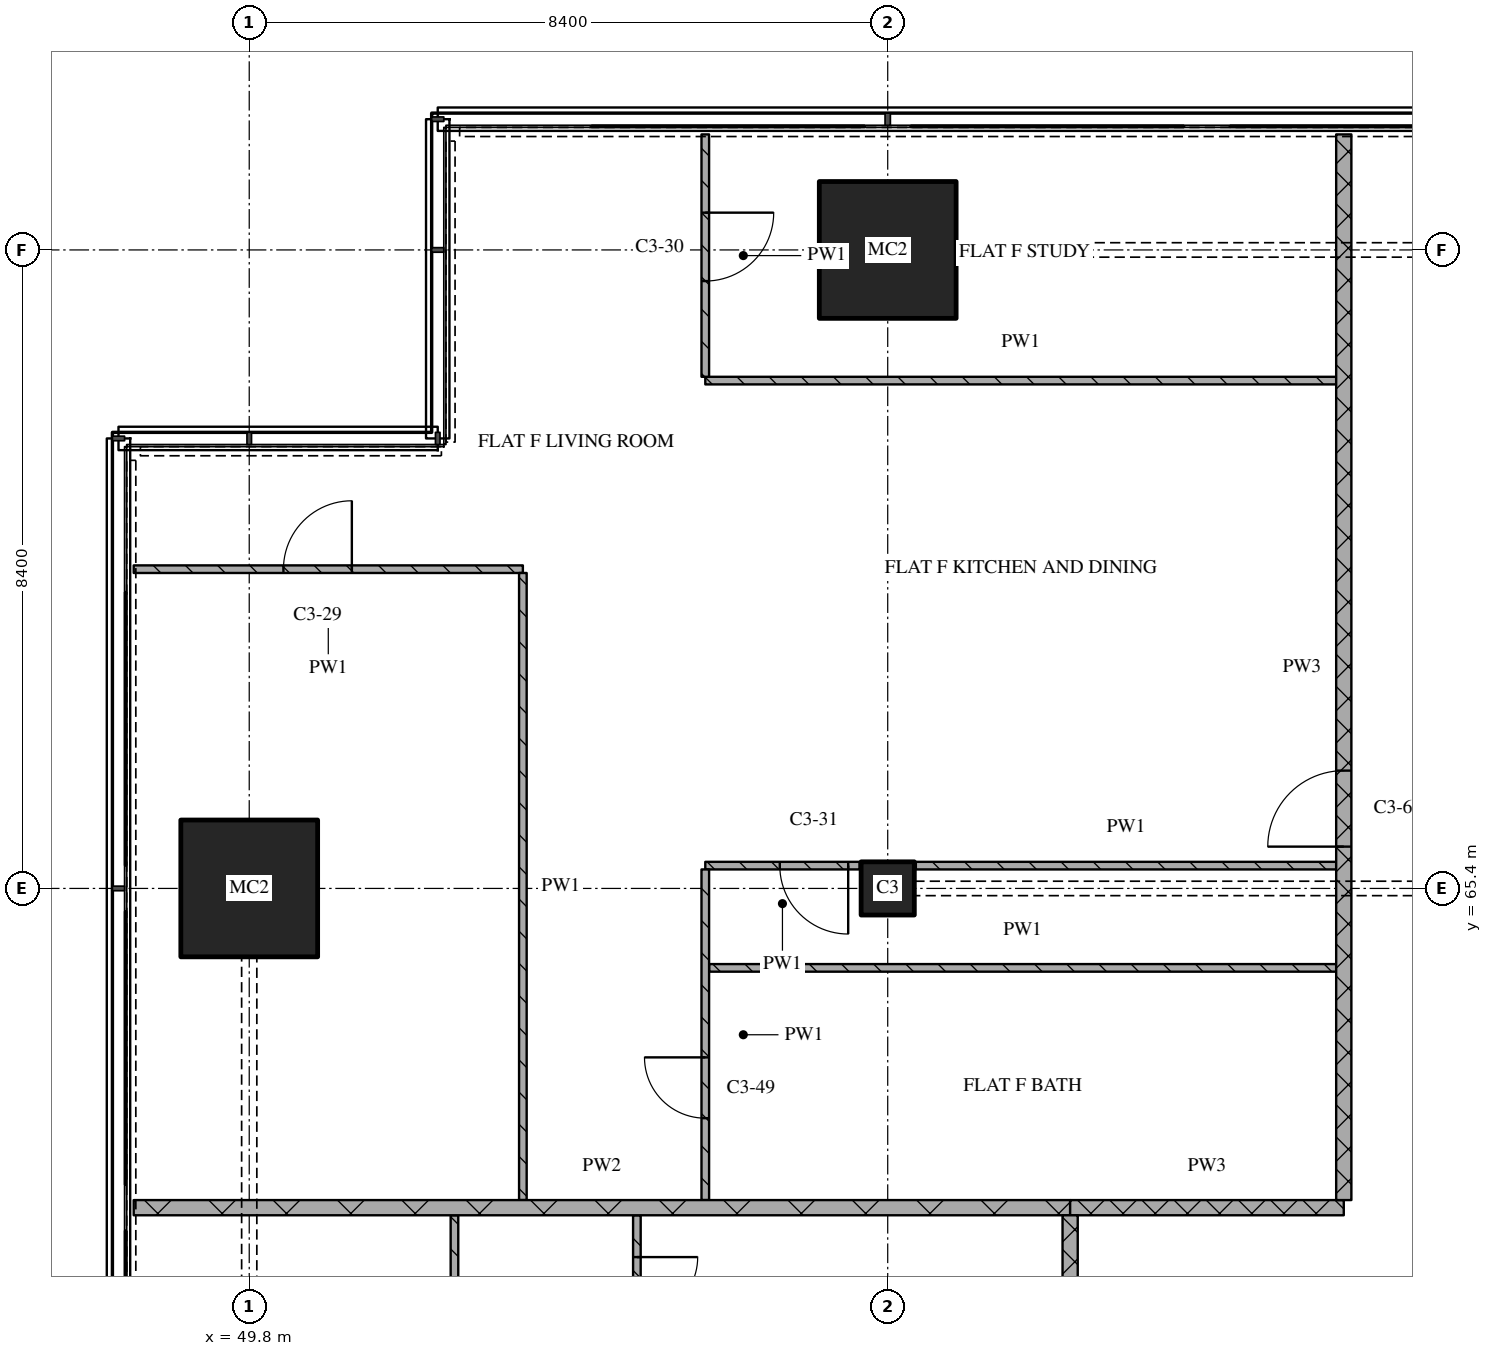
"""IFC4 building model, lengths in metres.
Left out: names, types, materials, properties, quantities, classifications, styles, units other than length and angle.
Written with IfcOpenShell. Run it as: python <this file> out.ifc"""

import sys

from ifc_helpers import new_model, si_unit, direction, frame, frame_2d, origin, origin_2d, place, context, subcontext, project, spatial, rectangle, extrude, element, fill, save


model = new_model("IFC4")
c1 = context("Model", 3, precision=1e-05, world=origin(), true_north=direction((0.0, 1.0)))
c2 = subcontext(c1, "Body", "Model", "MODEL_VIEW")
j1 = project(units=[si_unit("LENGTHUNIT", "METRE"), si_unit("PLANEANGLEUNIT", "RADIAN")], contexts=[c1])
p1 = place(None, origin())
s1 = spatial("IfcSite", under=j1, at=p1, CompositionType="ELEMENT")
p2 = place(p1, origin())
s2 = spatial("IfcBuilding", under=s1, at=p2, CompositionType="ELEMENT")
p3 = place(p2, frame((0.0, 0.0, 176.25)))
s3 = spatial("IfcBuildingStorey", under=s2, at=p3, CompositionType="ELEMENT", Elevation=176.25)
p4 = place(p3, frame((49.8, 65.4, 0.0), z_axis=(0.0, 0.0, 1.0), x_axis=(1.0, 0.0, 0.0)))
e1 = element("IfcColumn", 1, at=p4, inside=s3, PredefinedType="COLUMN", context=c2, shape_type="SweptSolid", body=[
    extrude(rectangle(XDim=1.8, YDim=1.8, at=origin_2d()), origin(), (0.0, 0.0, 1.0), 3.6),
])
p5 = place(p3, frame((58.2, 65.4, 0.0), z_axis=(0.0, 0.0, 1.0), x_axis=(1.0, 0.0, 0.0)))
e2 = element("IfcColumn", 2, at=p5, inside=s3, PredefinedType="COLUMN", context=c2, shape_type="SweptSolid", body=[
    extrude(rectangle(XDim=0.7, YDim=0.7, at=origin_2d()), origin(), (0.0, 0.0, 1.0), 3.6),
])
p6 = place(p3, frame((58.2, 73.8, 0.0), z_axis=(0.0, 0.0, 1.0), x_axis=(1.0, 0.0, 0.0)))
e3 = element("IfcColumn", 3, at=p6, inside=s3, PredefinedType="COLUMN", context=c2, shape_type="SweptSolid", body=[
    extrude(rectangle(XDim=1.8, YDim=1.8, at=origin_2d()), origin(), (0.0, 0.0, 1.0), 3.6),
])
p7 = place(p3, frame((60.6, 61.2, 0.0), z_axis=(0.0, 0.0, 1.0), x_axis=(1.0, 0.0, 0.0)))
e4 = element("IfcWall", 4, at=p7, inside=s3, PredefinedType="PARTITIONING", context=c2, shape_type="SweptSolid", body=[
    extrude(rectangle(XDim=3.6, YDim=0.2, at=frame_2d((1.8, 0.0))), origin(), (0.0, 0.0, 1.0), 3.32),
])
p8 = place(p3, frame((48.28, 61.2, 0.0), z_axis=(0.0, 0.0, 1.0), x_axis=(1.0, 0.0, 0.0)))
e5 = element("IfcWall", 5, at=p8, inside=s3, PredefinedType="PARTITIONING", context=c2, shape_type="SweptSolid", body=[
    extrude(rectangle(XDim=12.32, YDim=0.2, at=frame_2d((6.16, 0.0))), origin(), (0.0, 0.0, 1.0), 3.32),
])
p9 = place(p3, frame((55.85, 64.355, 0.0), z_axis=(0.0, 0.0, 1.0), x_axis=(1.0, 0.0, 0.0)))
e6 = element("IfcWall", 6, at=p9, inside=s3, PredefinedType="PARTITIONING", context=c2, shape_type="SweptSolid", body=[
    extrude(rectangle(XDim=8.25, YDim=0.1, at=frame_2d((4.125, 0.0))), origin(), (0.0, 0.0, 1.0), 3.32),
])
p10 = place(p3, frame((57.83, 65.7, 0.0), z_axis=(0.0, 0.0, 1.0), x_axis=(-1.0, 0.0, 0.0)))
e7 = element("IfcWall", 7, at=p10, inside=s3, PredefinedType="PARTITIONING", context=c2, shape_type="SweptSolid", body=[
    extrude(rectangle(XDim=2.03, YDim=0.1, at=frame_2d((1.015, 0.0))), origin(), (0.0, 0.0, 1.0), 3.32),
])
p11 = place(p10, frame((0.15, 0.0, 0.0)))
e8 = element("IfcOpeningElement", 8, at=p11, cuts=e7, PredefinedType="OPENING", context=c2, shape_type="SweptSolid", body=[
    extrude(rectangle(XDim=0.9, YDim=2.1, at=frame_2d((0.45, 1.05))), frame((0.0, 0.06, 0.0), z_axis=(0.0, -1.0, 0.0), x_axis=(1.0, 0.0, 0.0)), (0.0, 0.0, 1.0), 0.12),
])
p12 = place(p3, frame((58.57, 65.7, 0.0), z_axis=(0.0, 0.0, 1.0), x_axis=(1.0, 0.0, 0.0)))
e9 = element("IfcWall", 9, at=p12, inside=s3, PredefinedType="PARTITIONING", context=c2, shape_type="SweptSolid", body=[
    extrude(rectangle(XDim=5.53, YDim=0.1, at=frame_2d((2.765, 0.0))), origin(), (0.0, 0.0, 1.0), 3.32),
])
p13 = place(p3, frame((53.4, 69.6, 0.0), z_axis=(0.0, 0.0, 1.0), x_axis=(-1.0, 0.0, 0.0)))
e10 = element("IfcWall", 10, at=p13, inside=s3, PredefinedType="PARTITIONING", context=c2, shape_type="SweptSolid", body=[
    extrude(rectangle(XDim=5.12, YDim=0.1, at=frame_2d((2.56, 0.0))), origin(), (0.0, 0.0, 1.0), 3.32),
])
p14 = place(p13, frame((2.25, 0.0, 0.0)))
e11 = element("IfcOpeningElement", 11, at=p14, cuts=e10, PredefinedType="OPENING", context=c2, shape_type="SweptSolid", body=[
    extrude(rectangle(XDim=0.9, YDim=2.1, at=frame_2d((0.45, 1.05))), frame((0.0, 0.06, 0.0), z_axis=(0.0, -1.0, 0.0), x_axis=(1.0, 0.0, 0.0)), (0.0, 0.0, 1.0), 0.12),
])
p15 = place(p3, frame((55.8, 72.081, 0.0), z_axis=(0.0, 0.0, 1.0), x_axis=(1.0, 0.0, 0.0)))
e12 = element("IfcWall", 12, at=p15, inside=s3, PredefinedType="PARTITIONING", context=c2, shape_type="SweptSolid", body=[
    extrude(rectangle(XDim=8.3, YDim=0.1, at=frame_2d((4.15, 0.0))), origin(), (0.0, 0.0, 1.0), 3.32),
])
for number, where, z_axis, x_axis in (
    (13, (52.5, 61.1, 0.0), (0.0, 0.0, 1.0), (0.0, -1.0, 0.0)),
    (14, (53.4, 69.55, 0.0), (0.0, 0.0, 1.0), (0.0, -1.0, 0.0)),
):
    element("IfcWall", number, at=place(p3, frame(where, z_axis=z_axis, x_axis=x_axis)), inside=s3, PredefinedType="PARTITIONING", context=c2, shape_type="SweptSolid", body=[
        extrude(rectangle(XDim=8.25, YDim=0.1, at=frame_2d((4.125, 0.0))), origin(), (0.0, 0.0, 1.0), 3.32),
    ])
p16 = place(p3, frame((54.9, 61.1, 0.0), z_axis=(0.0, 0.0, 1.0), x_axis=(0.0, -1.0, 0.0)))
e15 = element("IfcWall", 15, at=p16, inside=s3, PredefinedType="PARTITIONING", context=c2, shape_type="SweptSolid", body=[
    extrude(rectangle(XDim=4.65, YDim=0.1, at=frame_2d((2.325, 0.0))), origin(), (0.0, 0.0, 1.0), 3.32),
])
p17 = place(p16, frame((0.55, 0.0, 0.0)))
e16 = element("IfcOpeningElement", 16, at=p17, cuts=e15, PredefinedType="OPENING", context=c2, shape_type="SweptSolid", body=[
    extrude(rectangle(XDim=0.8, YDim=2.1, at=frame_2d((0.4, 1.05))), frame((0.0, 0.06, 0.0), z_axis=(0.0, -1.0, 0.0), x_axis=(1.0, 0.0, 0.0)), (0.0, 0.0, 1.0), 0.12),
])
p18 = place(p3, frame((55.8, 65.65, 0.0), z_axis=(0.0, 0.0, 1.0), x_axis=(0.0, -1.0, 0.0)))
e17 = element("IfcWall", 17, at=p18, inside=s3, PredefinedType="PARTITIONING", context=c2, shape_type="SweptSolid", body=[
    extrude(rectangle(XDim=4.35, YDim=0.1, at=frame_2d((2.175, 0.0))), origin(), (0.0, 0.0, 1.0), 3.32),
])
p19 = place(p18, frame((2.473, 0.0, 0.0)))
e18 = element("IfcOpeningElement", 18, at=p19, cuts=e17, PredefinedType="OPENING", context=c2, shape_type="SweptSolid", body=[
    extrude(rectangle(XDim=0.8, YDim=2.1, at=frame_2d((0.4, 1.05))), frame((0.0, 0.06, 0.0), z_axis=(0.0, -1.0, 0.0), x_axis=(1.0, 0.0, 0.0)), (0.0, 0.0, 1.0), 0.12),
])
p20 = place(p3, frame((55.8, 75.32, 0.0), z_axis=(0.0, 0.0, 1.0), x_axis=(0.0, -1.0, 0.0)))
e19 = element("IfcWall", 19, at=p20, inside=s3, PredefinedType="PARTITIONING", context=c2, shape_type="SweptSolid", body=[
    extrude(rectangle(XDim=3.189, YDim=0.1, at=frame_2d((1.594, 0.0))), origin(), (0.0, 0.0, 1.0), 3.32),
])
p21 = place(p20, frame((1.03, 0.0, 0.0)))
e20 = element("IfcOpeningElement", 20, at=p21, cuts=e19, PredefinedType="OPENING", context=c2, shape_type="SweptSolid", body=[
    extrude(rectangle(XDim=0.9, YDim=2.1, at=frame_2d((0.45, 1.05))), frame((0.0, 0.06, 0.0), z_axis=(0.0, -1.0, 0.0), x_axis=(1.0, 0.0, 0.0)), (0.0, 0.0, 1.0), 0.12),
])
p22 = place(p3, frame((60.6, 43.3, 0.0), z_axis=(0.0, 0.0, 1.0), x_axis=(0.0, 1.0, 0.0)))
e21 = element("IfcWall", 21, at=p22, inside=s3, PredefinedType="PARTITIONING", context=c2, shape_type="SweptSolid", body=[
    extrude(rectangle(XDim=17.8, YDim=0.2, at=frame_2d((8.9, 0.0))), origin(), (0.0, 0.0, 1.0), 3.32),
])
p23 = place(p22, frame((11.85, 0.0, 0.0)))
e22 = element("IfcOpeningElement", 22, at=p23, cuts=e21, PredefinedType="OPENING", context=c2, shape_type="SweptSolid", body=[
    extrude(rectangle(XDim=1.0, YDim=2.1, at=frame_2d((0.5, 1.05))), frame((0.0, 0.11, 0.0), z_axis=(0.0, -1.0, 0.0), x_axis=(1.0, 0.0, 0.0)), (0.0, 0.0, 1.0), 0.22),
])
p24 = place(p3, frame((64.2, 61.3, 0.0), z_axis=(0.0, 0.0, 1.0), x_axis=(0.0, 1.0, 0.0)))
e23 = element("IfcWall", 23, at=p24, inside=s3, PredefinedType="PARTITIONING", context=c2, shape_type="SweptSolid", body=[
    extrude(rectangle(XDim=14.02, YDim=0.2, at=frame_2d((7.01, 0.0))), origin(), (0.0, 0.0, 1.0), 3.32),
])
p25 = place(p24, frame((4.65, 0.0, 0.0)))
e24 = element("IfcOpeningElement", 24, at=p25, cuts=e23, PredefinedType="OPENING", context=c2, shape_type="SweptSolid", body=[
    extrude(rectangle(XDim=1.0, YDim=2.1, at=frame_2d((0.5, 1.05))), frame((0.0, 0.11, 0.0), z_axis=(0.0, -1.0, 0.0), x_axis=(1.0, 0.0, 0.0)), (0.0, 0.0, 1.0), 0.22),
])
p26 = place(p11, origin())
e25 = element("IfcDoor", 25, at=p26, inside=s3, OperationType="SINGLE_SWING_LEFT", PredefinedType="DOOR", context=c2, shape_type="SweptSolid", body=[
    extrude(rectangle(XDim=0.9, YDim=2.1, at=frame_2d((0.45, 1.05))), frame((0.0, 0.025, 0.0), z_axis=(0.0, -1.0, 0.0), x_axis=(1.0, 0.0, 0.0)), (0.0, 0.0, 1.0), 0.05),
])
fill(e8, e25)
p27 = place(p14, origin())
e26 = element("IfcDoor", 26, at=p27, inside=s3, OperationType="SINGLE_SWING_RIGHT", PredefinedType="DOOR", context=c2, shape_type="SweptSolid", body=[
    extrude(rectangle(XDim=0.9, YDim=2.1, at=frame_2d((0.45, 1.05))), frame((0.0, 0.025, 0.0), z_axis=(0.0, -1.0, 0.0), x_axis=(1.0, 0.0, 0.0)), (0.0, 0.0, 1.0), 0.05),
])
fill(e11, e26)
p28 = place(p17, origin())
e27 = element("IfcDoor", 27, at=p28, inside=s3, OperationType="SINGLE_SWING_LEFT", PredefinedType="DOOR", context=c2, shape_type="SweptSolid", body=[
    extrude(rectangle(XDim=0.8, YDim=2.1, at=frame_2d((0.4, 1.05))), frame((0.0, 0.025, 0.0), z_axis=(0.0, -1.0, 0.0), x_axis=(1.0, 0.0, 0.0)), (0.0, 0.0, 1.0), 0.05),
])
fill(e16, e27)
p29 = place(p19, origin())
e28 = element("IfcDoor", 28, at=p29, inside=s3, OperationType="SINGLE_SWING_RIGHT", PredefinedType="DOOR", context=c2, shape_type="SweptSolid", body=[
    extrude(rectangle(XDim=0.8, YDim=2.1, at=frame_2d((0.4, 1.05))), frame((0.0, 0.025, 0.0), z_axis=(0.0, -1.0, 0.0), x_axis=(1.0, 0.0, 0.0)), (0.0, 0.0, 1.0), 0.05),
])
fill(e18, e28)
p30 = place(p21, origin())
e29 = element("IfcDoor", 29, at=p30, inside=s3, OperationType="SINGLE_SWING_LEFT", PredefinedType="DOOR", context=c2, shape_type="SweptSolid", body=[
    extrude(rectangle(XDim=0.9, YDim=2.1, at=frame_2d((0.45, 1.05))), frame((0.0, 0.025, 0.0), z_axis=(0.0, -1.0, 0.0), x_axis=(1.0, 0.0, 0.0)), (0.0, 0.0, 1.0), 0.05),
])
fill(e20, e29)
p31 = place(p25, origin())
e30 = element("IfcDoor", 30, at=p31, inside=s3, OperationType="SINGLE_SWING_LEFT", PredefinedType="DOOR", context=c2, shape_type="SweptSolid", body=[
    extrude(rectangle(XDim=1.0, YDim=2.1, at=frame_2d((0.5, 1.05))), frame((0.0, 0.025, 0.0), z_axis=(0.0, -1.0, 0.0), x_axis=(1.0, 0.0, 0.0)), (0.0, 0.0, 1.0), 0.05),
])
fill(e24, e30)
save(model, sys.argv[1])
